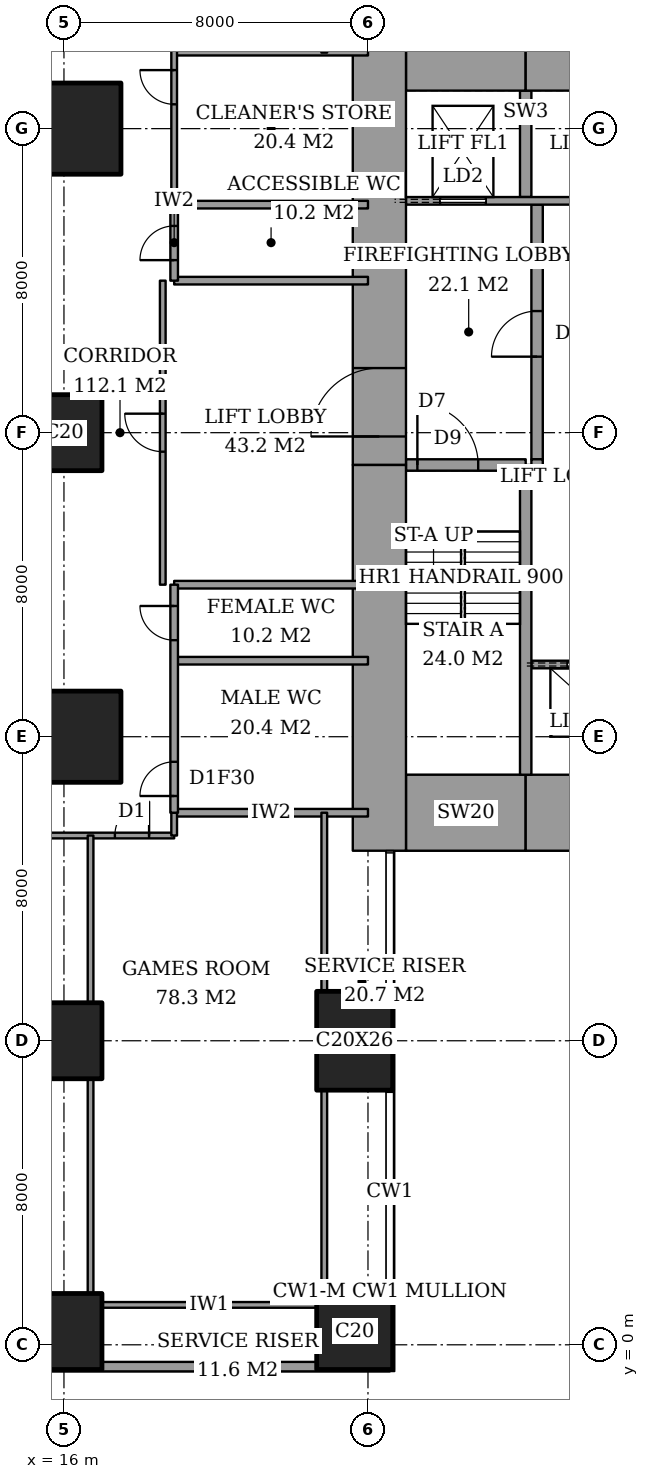
"""IFC4 building model, lengths in metres.
Left out: names, types, materials, properties, quantities, classifications, styles, units other than length and angle.
Written with IfcOpenShell. Run it as: python <this file> out.ifc"""

import sys

from ifc_helpers import new_model, si_unit, direction, frame, frame_2d, origin, origin_2d, place, context, subcontext, project, spatial, rectangle, extrude, element, fill, save


model = new_model("IFC4")
c1 = context("Model", 3, precision=1e-05, world=origin(), true_north=direction((0.0, 1.0)))
c2 = subcontext(c1, "Body", "Model", "MODEL_VIEW")
j1 = project(units=[si_unit("LENGTHUNIT", "METRE"), si_unit("PLANEANGLEUNIT", "RADIAN")], contexts=[c1])
p1 = place(None, origin())
s1 = spatial("IfcSite", under=j1, at=p1, CompositionType="ELEMENT")
p2 = place(p1, origin())
s2 = spatial("IfcBuilding", under=s1, at=p2, CompositionType="ELEMENT")
p3 = place(p2, frame((0.0, 0.0, 132.2)))
s3 = spatial("IfcBuildingStorey", under=s2, at=p3, CompositionType="ELEMENT", Elevation=132.2)
for number, where, z_axis, x_axis in (
    (1, (16.0, 0.35, 0.0), (0.0, 0.0, 1.0), (1.0, 0.0, 0.0)),
    (2, (16.0, 8.0, 0.0), (0.0, 0.0, 1.0), (1.0, 0.0, 0.0)),
):
    element("IfcColumn", number, at=place(p3, frame(where, z_axis=z_axis, x_axis=x_axis)), inside=s3, PredefinedType="COLUMN", context=c2, shape_type="SweptSolid", body=[
        extrude(rectangle(XDim=2.0, YDim=2.0, at=origin_2d()), origin(), (0.0, 0.0, 1.0), 3.6),
    ])
p4 = place(p3, frame((16.0, 16.0, 0.0), z_axis=(0.0, 0.0, 1.0), x_axis=(1.0, 0.0, 0.0)))
e3 = element("IfcColumn", 3, at=p4, inside=s3, PredefinedType="COLUMN", context=c2, shape_type="SweptSolid", body=[
    extrude(rectangle(XDim=3.0, YDim=2.4, at=origin_2d()), origin(), (0.0, 0.0, 1.0), 3.6),
])
p5 = place(p3, frame((16.0, 24.0, 0.0), z_axis=(0.0, 0.0, 1.0), x_axis=(1.0, 0.0, 0.0)))
e4 = element("IfcColumn", 4, at=p5, inside=s3, PredefinedType="COLUMN", context=c2, shape_type="SweptSolid", body=[
    extrude(rectangle(XDim=2.0, YDim=2.0, at=origin_2d()), origin(), (0.0, 0.0, 1.0), 3.6),
])
p6 = place(p3, frame((16.0, 32.0, 0.0), z_axis=(0.0, 0.0, 1.0), x_axis=(1.0, 0.0, 0.0)))
e5 = element("IfcColumn", 5, at=p6, inside=s3, PredefinedType="COLUMN", context=c2, shape_type="SweptSolid", body=[
    extrude(rectangle(XDim=3.0, YDim=2.4, at=origin_2d()), origin(), (0.0, 0.0, 1.0), 3.6),
])
p7 = place(p3, frame((23.65, 0.35, 0.0), z_axis=(0.0, 0.0, 1.0), x_axis=(1.0, 0.0, 0.0)))
e6 = element("IfcColumn", 6, at=p7, inside=s3, PredefinedType="COLUMN", context=c2, shape_type="SweptSolid", body=[
    extrude(rectangle(XDim=2.0, YDim=2.0, at=origin_2d()), origin(), (0.0, 0.0, 1.0), 3.6),
])
p8 = place(p3, frame((23.65, 8.0, 0.0), z_axis=(0.0, 0.0, 1.0), x_axis=(1.0, 0.0, 0.0)))
e7 = element("IfcColumn", 7, at=p8, inside=s3, PredefinedType="COLUMN", context=c2, shape_type="SweptSolid", body=[
    extrude(rectangle(XDim=2.0, YDim=2.6, at=origin_2d()), origin(), (0.0, 0.0, 1.0), 3.6),
])
p9 = place(p3, frame((25.0, 14.0, 0.0), z_axis=(0.0, 0.0, 1.0), x_axis=(1.0, 0.0, 0.0)))
e8 = element("IfcWall", 8, at=p9, inside=s3, PredefinedType="SHEAR", context=c2, shape_type="SweptSolid", body=[
    extrude(rectangle(XDim=3.15, YDim=2.0, at=frame_2d((1.575, 0.0))), origin(), (0.0, 0.0, 1.0), 3.6),
])
p10 = place(p3, frame((28.15, 14.0, 0.0), z_axis=(0.0, 0.0, 1.0), x_axis=(1.0, 0.0, 0.0)))
e9 = element("IfcWall", 9, at=p10, inside=s3, PredefinedType="SHEAR", context=c2, shape_type="SweptSolid", body=[
    extrude(rectangle(XDim=9.7, YDim=2.0, at=frame_2d((4.85, 0.0))), origin(), (0.0, 0.0, 1.0), 3.6),
])
p11 = place(p3, frame((25.0, 34.0, 0.0), z_axis=(0.0, 0.0, 1.0), x_axis=(1.0, 0.0, 0.0)))
e10 = element("IfcWall", 10, at=p11, inside=s3, PredefinedType="SHEAR", context=c2, shape_type="SweptSolid", body=[
    extrude(rectangle(XDim=3.15, YDim=2.0, at=frame_2d((1.575, 0.0))), origin(), (0.0, 0.0, 1.0), 3.6),
])
p12 = place(p3, frame((28.15, 34.0, 0.0), z_axis=(0.0, 0.0, 1.0), x_axis=(1.0, 0.0, 0.0)))
e11 = element("IfcWall", 11, at=p12, inside=s3, PredefinedType="SHEAR", context=c2, shape_type="SweptSolid", body=[
    extrude(rectangle(XDim=9.7, YDim=2.0, at=frame_2d((4.85, 0.0))), origin(), (0.0, 0.0, 1.0), 3.6),
])
p13 = place(p3, frame((24.3, 13.0, 0.0), z_axis=(0.0, 0.0, 1.0), x_axis=(0.0, 1.0, 0.0)))
e12 = element("IfcWall", 12, at=p13, inside=s3, PredefinedType="SHEAR", context=c2, shape_type="SweptSolid", body=[
    extrude(rectangle(XDim=10.15, YDim=1.4, at=frame_2d((5.075, 0.0))), origin(), (0.0, 0.0, 1.0), 3.6),
])
p14 = place(p3, frame((24.3, 23.15, 0.0), z_axis=(0.0, 0.0, 1.0), x_axis=(0.0, 1.0, 0.0)))
e13 = element("IfcWall", 13, at=p14, inside=s3, PredefinedType="SHEAR", context=c2, shape_type="SweptSolid", body=[
    extrude(rectangle(XDim=11.85, YDim=1.4, at=frame_2d((5.925, 0.0))), origin(), (0.0, 0.0, 1.0), 3.6),
])
p15 = place(p14, frame((0.75, 0.0, 0.0)))
e14 = element("IfcOpeningElement", 14, at=p15, cuts=e13, PredefinedType="OPENING", context=c2, shape_type="SweptSolid", body=[
    extrude(rectangle(XDim=1.8, YDim=2.4, at=frame_2d((0.9, 1.2))), frame((0.0, 0.71, 0.0), z_axis=(0.0, -1.0, 0.0), x_axis=(1.0, 0.0, 0.0)), (0.0, 0.0, 1.0), 1.42),
])
p16 = place(p3, frame((28.15, 15.0, 0.0), z_axis=(0.0, 0.0, 1.0), x_axis=(0.0, 1.0, 0.0)))
e15 = element("IfcWall", 15, at=p16, inside=s3, PredefinedType="SHEAR", context=c2, shape_type="SweptSolid", body=[
    extrude(rectangle(XDim=8.15, YDim=0.3, at=frame_2d((4.075, 0.0))), origin(), (0.0, 0.0, 1.0), 3.6),
])
p17 = place(p3, frame((25.0, 23.15, 0.0), z_axis=(0.0, 0.0, 1.0), x_axis=(1.0, 0.0, 0.0)))
e16 = element("IfcWall", 16, at=p17, inside=s3, PredefinedType="SHEAR", context=c2, shape_type="SweptSolid", body=[
    extrude(rectangle(XDim=3.15, YDim=0.3, at=frame_2d((1.575, 0.0))), origin(), (0.0, 0.0, 1.0), 3.6),
])
p18 = place(p17, frame((0.3, 0.0, 0.0)))
e17 = element("IfcOpeningElement", 17, at=p18, cuts=e16, PredefinedType="OPENING", context=c2, shape_type="SweptSolid", body=[
    extrude(rectangle(XDim=1.6, YDim=2.1, at=frame_2d((0.8, 1.05))), frame((0.0, 0.16, 0.0), z_axis=(0.0, -1.0, 0.0), x_axis=(1.0, 0.0, 0.0)), (0.0, 0.0, 1.0), 0.32),
])
p19 = place(p3, frame((28.45, 23.3, 0.0), z_axis=(0.0, 0.0, 1.0), x_axis=(0.0, 1.0, 0.0)))
e18 = element("IfcWall", 18, at=p19, inside=s3, PredefinedType="PARTITIONING", context=c2, shape_type="SweptSolid", body=[
    extrude(rectangle(XDim=6.7, YDim=0.3, at=frame_2d((3.35, 0.0))), origin(), (0.0, 0.0, 1.0), 3.6),
])
p20 = place(p19, frame((2.7, 0.0, 0.0)))
e19 = element("IfcOpeningElement", 19, at=p20, cuts=e18, PredefinedType="OPENING", context=c2, shape_type="SweptSolid", body=[
    extrude(rectangle(XDim=1.2, YDim=2.1, at=frame_2d((0.6, 1.05))), frame((0.0, 0.16, 0.0), z_axis=(0.0, -1.0, 0.0), x_axis=(1.0, 0.0, 0.0)), (0.0, 0.0, 1.0), 0.32),
])
p21 = place(p3, frame((3.175, -0.575, 0.0), z_axis=(0.0, 0.0, 1.0), x_axis=(1.0, 0.0, 0.0)))
e20 = element("IfcWall", 20, at=p21, inside=s3, PredefinedType="SOLIDWALL", context=c2, shape_type="SweptSolid", body=[
    extrude(rectangle(XDim=21.4, YDim=0.25, at=frame_2d((10.7, 0.0))), origin(), (0.0, 0.0, 1.0), 3.6),
])
p22 = place(p21, frame((0.625, 0.0, 0.4)))
e21 = element("IfcOpeningElement", 21, at=p22, cuts=e20, PredefinedType="OPENING", context=c2, shape_type="SweptSolid", body=[
    extrude(rectangle(XDim=1.2, YDim=2.2, at=frame_2d((0.6, 1.1))), frame((0.0, 0.135, 0.0), z_axis=(0.0, -1.0, 0.0), x_axis=(1.0, 0.0, 0.0)), (0.0, 0.0, 1.0), 0.27),
])
p23 = place(p3, frame((17.0, 1.05, 0.0), z_axis=(0.0, 0.0, 1.0), x_axis=(1.0, 0.0, 0.0)))
e22 = element("IfcWall", 22, at=p23, inside=s3, PredefinedType="PARTITIONING", context=c2, shape_type="SweptSolid", body=[
    extrude(rectangle(XDim=5.65, YDim=0.15, at=frame_2d((2.825, 0.0))), origin(), (0.0, 0.0, 1.0), 3.35),
])
p24 = place(p3, frame((13.5, 13.4, 0.0), z_axis=(0.0, 0.0, 1.0), x_axis=(1.0, 0.0, 0.0)))
e23 = element("IfcWall", 23, at=p24, inside=s3, PredefinedType="PARTITIONING", context=c2, shape_type="SweptSolid", body=[
    extrude(rectangle(XDim=5.4, YDim=0.15, at=frame_2d((2.7, 0.0))), origin(), (0.0, 0.0, 1.0), 3.35),
])
p25 = place(p24, frame((3.84, 0.0, 0.0)))
e24 = element("IfcOpeningElement", 24, at=p25, cuts=e23, PredefinedType="OPENING", context=c2, shape_type="SweptSolid", body=[
    extrude(rectangle(XDim=0.9, YDim=2.1, at=frame_2d((0.45, 1.05))), frame((0.0, 0.085, 0.0), z_axis=(0.0, -1.0, 0.0), x_axis=(1.0, 0.0, 0.0)), (0.0, 0.0, 1.0), 0.17),
])
for number, where, z_axis, x_axis in (
    (25, (18.9, 14.0, 0.0), (0.0, 0.0, 1.0), (1.0, 0.0, 0.0)),
    (26, (18.9, 18.0, 0.0), (0.0, 0.0, 1.0), (1.0, 0.0, 0.0)),
    (27, (18.9, 20.0, 0.0), (0.0, 0.0, 1.0), (1.0, 0.0, 0.0)),
    (28, (18.9, 28.0, 0.0), (0.0, 0.0, 1.0), (1.0, 0.0, 0.0)),
    (29, (18.9, 30.0, 0.0), (0.0, 0.0, 1.0), (1.0, 0.0, 0.0)),
):
    element("IfcWall", number, at=place(p3, frame(where, z_axis=z_axis, x_axis=x_axis)), inside=s3, PredefinedType="PARTITIONING", context=c2, shape_type="SweptSolid", body=[
        extrude(rectangle(XDim=5.1, YDim=0.2, at=frame_2d((2.55, 0.0))), origin(), (0.0, 0.0, 1.0), 3.35),
    ])
p26 = place(p3, frame((18.9, 34.0, 0.0), z_axis=(0.0, 0.0, 1.0), x_axis=(1.0, 0.0, 0.0)))
e30 = element("IfcWall", 30, at=p26, inside=s3, PredefinedType="PARTITIONING", context=c2, shape_type="SweptSolid", body=[
    extrude(rectangle(XDim=5.1, YDim=0.15, at=frame_2d((2.55, 0.0))), origin(), (0.0, 0.0, 1.0), 3.35),
])
p27 = place(p3, frame((16.7, 1.35, 0.0), z_axis=(0.0, 0.0, 1.0), x_axis=(0.0, 1.0, 0.0)))
e31 = element("IfcWall", 31, at=p27, inside=s3, PredefinedType="PARTITIONING", context=c2, shape_type="SweptSolid", body=[
    extrude(rectangle(XDim=5.65, YDim=0.15, at=frame_2d((2.825, 0.0))), origin(), (0.0, 0.0, 1.0), 3.35),
])
p28 = place(p3, frame((16.7, 9.0, 0.0), z_axis=(0.0, 0.0, 1.0), x_axis=(0.0, 1.0, 0.0)))
e32 = element("IfcWall", 32, at=p28, inside=s3, PredefinedType="PARTITIONING", context=c2, shape_type="SweptSolid", body=[
    extrude(rectangle(XDim=4.4, YDim=0.15, at=frame_2d((2.2, 0.0))), origin(), (0.0, 0.0, 1.0), 3.35),
])
p29 = place(p3, frame((18.6, 20.0, 0.0), z_axis=(0.0, 0.0, 1.0), x_axis=(0.0, 1.0, 0.0)))
e33 = element("IfcWall", 33, at=p29, inside=s3, PredefinedType="PARTITIONING", context=c2, shape_type="SweptSolid", body=[
    extrude(rectangle(XDim=8.0, YDim=0.15, at=frame_2d((4.0, 0.0))), origin(), (0.0, 0.0, 1.0), 3.35),
])
p30 = place(p29, frame((3.5, 0.0, 0.0)))
e34 = element("IfcOpeningElement", 34, at=p30, cuts=e33, PredefinedType="OPENING", context=c2, shape_type="SweptSolid", body=[
    extrude(rectangle(XDim=1.0, YDim=2.1, at=frame_2d((0.5, 1.05))), frame((0.0, 0.085, 0.0), z_axis=(0.0, -1.0, 0.0), x_axis=(1.0, 0.0, 0.0)), (0.0, 0.0, 1.0), 0.17),
])
p31 = place(p3, frame((18.9, 14.0, 0.0), z_axis=(0.0, 0.0, 1.0), x_axis=(0.0, 1.0, 0.0)))
e35 = element("IfcWall", 35, at=p31, inside=s3, PredefinedType="PARTITIONING", context=c2, shape_type="SweptSolid", body=[
    extrude(rectangle(XDim=6.0, YDim=0.2, at=frame_2d((3.0, 0.0))), origin(), (0.0, 0.0, 1.0), 3.35),
])
p32 = place(p31, frame((0.44, 0.0, 0.0)))
e36 = element("IfcOpeningElement", 36, at=p32, cuts=e35, PredefinedType="OPENING", context=c2, shape_type="SweptSolid", body=[
    extrude(rectangle(XDim=0.9, YDim=2.1, at=frame_2d((0.45, 1.05))), frame((0.0, 0.11, 0.0), z_axis=(0.0, -1.0, 0.0), x_axis=(1.0, 0.0, 0.0)), (0.0, 0.0, 1.0), 0.22),
])
p33 = place(p31, frame((4.54, 0.0, 0.0)))
e37 = element("IfcOpeningElement", 37, at=p33, cuts=e35, PredefinedType="OPENING", context=c2, shape_type="SweptSolid", body=[
    extrude(rectangle(XDim=0.9, YDim=2.1, at=frame_2d((0.45, 1.05))), frame((0.0, 0.11, 0.0), z_axis=(0.0, -1.0, 0.0), x_axis=(1.0, 0.0, 0.0)), (0.0, 0.0, 1.0), 0.22),
])
p34 = place(p3, frame((18.9, 28.0, 0.0), z_axis=(0.0, 0.0, 1.0), x_axis=(0.0, 1.0, 0.0)))
e38 = element("IfcWall", 38, at=p34, inside=s3, PredefinedType="PARTITIONING", context=c2, shape_type="SweptSolid", body=[
    extrude(rectangle(XDim=2.0, YDim=0.2, at=frame_2d((1.0, 0.0))), origin(), (0.0, 0.0, 1.0), 3.35),
])
p35 = place(p34, frame((0.54, 0.0, 0.0)))
e39 = element("IfcOpeningElement", 39, at=p35, cuts=e38, PredefinedType="OPENING", context=c2, shape_type="SweptSolid", body=[
    extrude(rectangle(XDim=0.9, YDim=2.1, at=frame_2d((0.45, 1.05))), frame((0.0, 0.11, 0.0), z_axis=(0.0, -1.0, 0.0), x_axis=(1.0, 0.0, 0.0)), (0.0, 0.0, 1.0), 0.22),
])
p36 = place(p3, frame((18.9, 13.4, 0.0), z_axis=(0.0, 0.0, 1.0), x_axis=(0.0, 1.0, 0.0)))
e40 = element("IfcWall", 40, at=p36, inside=s3, PredefinedType="PARTITIONING", context=c2, shape_type="SweptSolid", body=[
    extrude(rectangle(XDim=0.6, YDim=0.15, at=frame_2d((0.3, 0.0))), origin(), (0.0, 0.0, 1.0), 3.35),
])
p37 = place(p3, frame((18.9, 30.0, 0.0), z_axis=(0.0, 0.0, 1.0), x_axis=(0.0, 1.0, 0.0)))
e41 = element("IfcWall", 41, at=p37, inside=s3, PredefinedType="PARTITIONING", context=c2, shape_type="SweptSolid", body=[
    extrude(rectangle(XDim=4.6, YDim=0.15, at=frame_2d((2.3, 0.0))), origin(), (0.0, 0.0, 1.0), 3.35),
])
p38 = place(p37, frame((2.64, 0.0, 0.0)))
e42 = element("IfcOpeningElement", 42, at=p38, cuts=e41, PredefinedType="OPENING", context=c2, shape_type="SweptSolid", body=[
    extrude(rectangle(XDim=0.9, YDim=2.1, at=frame_2d((0.45, 1.05))), frame((0.0, 0.085, 0.0), z_axis=(0.0, -1.0, 0.0), x_axis=(1.0, 0.0, 0.0)), (0.0, 0.0, 1.0), 0.17),
])
p39 = place(p3, frame((22.85, 1.35, 0.0), z_axis=(0.0, 0.0, 1.0), x_axis=(0.0, 1.0, 0.0)))
e43 = element("IfcWall", 43, at=p39, inside=s3, PredefinedType="PARTITIONING", context=c2, shape_type="SweptSolid", body=[
    extrude(rectangle(XDim=5.35, YDim=0.15, at=frame_2d((2.675, 0.0))), origin(), (0.0, 0.0, 1.0), 3.35),
])
p40 = place(p3, frame((22.85, 9.3, 0.0), z_axis=(0.0, 0.0, 1.0), x_axis=(0.0, 1.0, 0.0)))
e44 = element("IfcWall", 44, at=p40, inside=s3, PredefinedType="PARTITIONING", context=c2, shape_type="SweptSolid", body=[
    extrude(rectangle(XDim=4.7, YDim=0.15, at=frame_2d((2.35, 0.0))), origin(), (0.0, 0.0, 1.0), 3.35),
])
p41 = place(p3, frame((28.3, 17.9, 0.0), z_axis=(0.0, 0.0, 1.0), x_axis=(1.0, 0.0, 0.0)))
e45 = element("IfcWall", 45, at=p41, inside=s3, PredefinedType="PARTITIONING", context=c2, shape_type="SweptSolid", body=[
    extrude(rectangle(XDim=12.7, YDim=0.2, at=frame_2d((6.35, 0.0))), origin(), (0.0, 0.0, 1.0), 3.6),
])
p42 = place(p41, frame((0.95, 0.0, 0.0)))
e46 = element("IfcOpeningElement", 46, at=p42, cuts=e45, PredefinedType="OPENING", context=c2, shape_type="SweptSolid", body=[
    extrude(rectangle(XDim=1.1, YDim=2.1, at=frame_2d((0.55, 1.05))), frame((0.0, 0.11, 0.0), z_axis=(0.0, -1.0, 0.0), x_axis=(1.0, 0.0, 0.0)), (0.0, 0.0, 1.0), 0.22),
])
p43 = place(p41, frame((4.15, 0.0, 0.0)))
e47 = element("IfcOpeningElement", 47, at=p43, cuts=e45, PredefinedType="OPENING", context=c2, shape_type="SweptSolid", body=[
    extrude(rectangle(XDim=1.1, YDim=2.1, at=frame_2d((0.55, 1.05))), frame((0.0, 0.11, 0.0), z_axis=(0.0, -1.0, 0.0), x_axis=(1.0, 0.0, 0.0)), (0.0, 0.0, 1.0), 0.22),
])
p44 = place(p41, frame((7.35, 0.0, 0.0)))
e48 = element("IfcOpeningElement", 48, at=p44, cuts=e45, PredefinedType="OPENING", context=c2, shape_type="SweptSolid", body=[
    extrude(rectangle(XDim=1.1, YDim=2.1, at=frame_2d((0.55, 1.05))), frame((0.0, 0.11, 0.0), z_axis=(0.0, -1.0, 0.0), x_axis=(1.0, 0.0, 0.0)), (0.0, 0.0, 1.0), 0.22),
])
p45 = place(p41, frame((10.6, 0.0, 0.0)))
e49 = element("IfcOpeningElement", 49, at=p45, cuts=e45, PredefinedType="OPENING", context=c2, shape_type="SweptSolid", body=[
    extrude(rectangle(XDim=1.2, YDim=2.1, at=frame_2d((0.6, 1.05))), frame((0.0, 0.11, 0.0), z_axis=(0.0, -1.0, 0.0), x_axis=(1.0, 0.0, 0.0)), (0.0, 0.0, 1.0), 0.22),
])
p46 = place(p3, frame((25.0, 30.1, 0.0), z_axis=(0.0, 0.0, 1.0), x_axis=(1.0, 0.0, 0.0)))
e50 = element("IfcWall", 50, at=p46, inside=s3, PredefinedType="PARTITIONING", context=c2, shape_type="SweptSolid", body=[
    extrude(rectangle(XDim=12.7, YDim=0.2, at=frame_2d((6.35, 0.0))), origin(), (0.0, 0.0, 1.0), 3.6),
])
p47 = place(p46, frame((0.9, 0.0, 0.0)))
e51 = element("IfcOpeningElement", 51, at=p47, cuts=e50, PredefinedType="OPENING", context=c2, shape_type="SweptSolid", body=[
    extrude(rectangle(XDim=1.2, YDim=2.1, at=frame_2d((0.6, 1.05))), frame((0.0, 0.11, 0.0), z_axis=(0.0, -1.0, 0.0), x_axis=(1.0, 0.0, 0.0)), (0.0, 0.0, 1.0), 0.22),
])
p48 = place(p3, frame((28.15, 30.2, 0.0), z_axis=(0.0, 0.0, 1.0), x_axis=(0.0, 1.0, 0.0)))
e52 = element("IfcWall", 52, at=p48, inside=s3, PredefinedType="SHEAR", context=c2, shape_type="SweptSolid", body=[
    extrude(rectangle(XDim=2.8, YDim=0.3, at=frame_2d((1.4, 0.0))), origin(), (0.0, 0.0, 1.0), 3.6),
])
p49 = place(p3, frame((28.3, 23.2, 0.0), z_axis=(0.0, 0.0, 1.0), x_axis=(1.0, 0.0, 0.0)))
e53 = element("IfcWall", 53, at=p49, inside=s3, PredefinedType="PARTITIONING", context=c2, shape_type="SweptSolid", body=[
    extrude(rectangle(XDim=0.3, YDim=0.2, at=frame_2d((0.15, 0.0))), origin(), (0.0, 0.0, 1.0), 3.6),
])
p50 = place(p30, origin())
e54 = element("IfcDoor", 54, at=p50, inside=s3, OperationType="SINGLE_SWING_LEFT", PredefinedType="DOOR", context=c2, shape_type="SweptSolid", body=[
    extrude(rectangle(XDim=1.0, YDim=2.1, at=frame_2d((0.5, 1.05))), frame((0.0, 0.025, 0.0), z_axis=(0.0, -1.0, 0.0), x_axis=(1.0, 0.0, 0.0)), (0.0, 0.0, 1.0), 0.05),
])
fill(e34, e54)
p51 = place(p32, origin())
e55 = element("IfcDoor", 55, at=p51, inside=s3, OperationType="SINGLE_SWING_RIGHT", PredefinedType="DOOR", context=c2, shape_type="SweptSolid", body=[
    extrude(rectangle(XDim=0.9, YDim=2.1, at=frame_2d((0.45, 1.05))), frame((0.0, 0.025, 0.0), z_axis=(0.0, -1.0, 0.0), x_axis=(1.0, 0.0, 0.0)), (0.0, 0.0, 1.0), 0.05),
])
fill(e36, e55)
p52 = place(p33, origin())
e56 = element("IfcDoor", 56, at=p52, inside=s3, OperationType="SINGLE_SWING_LEFT", PredefinedType="DOOR", context=c2, shape_type="SweptSolid", body=[
    extrude(rectangle(XDim=0.9, YDim=2.1, at=frame_2d((0.45, 1.05))), frame((0.0, 0.025, 0.0), z_axis=(0.0, -1.0, 0.0), x_axis=(1.0, 0.0, 0.0)), (0.0, 0.0, 1.0), 0.05),
])
fill(e37, e56)
p53 = place(p35, origin())
e57 = element("IfcDoor", 57, at=p53, inside=s3, OperationType="SINGLE_SWING_RIGHT", PredefinedType="DOOR", context=c2, shape_type="SweptSolid", body=[
    extrude(rectangle(XDim=0.9, YDim=2.1, at=frame_2d((0.45, 1.05))), frame((0.0, 0.025, 0.0), z_axis=(0.0, -1.0, 0.0), x_axis=(1.0, 0.0, 0.0)), (0.0, 0.0, 1.0), 0.05),
])
fill(e39, e57)
p54 = place(p38, origin())
e58 = element("IfcDoor", 58, at=p54, inside=s3, OperationType="SINGLE_SWING_LEFT", PredefinedType="DOOR", context=c2, shape_type="SweptSolid", body=[
    extrude(rectangle(XDim=0.9, YDim=2.1, at=frame_2d((0.45, 1.05))), frame((0.0, 0.025, 0.0), z_axis=(0.0, -1.0, 0.0), x_axis=(1.0, 0.0, 0.0)), (0.0, 0.0, 1.0), 0.05),
])
fill(e42, e58)
p55 = place(p25, origin())
e59 = element("IfcDoor", 59, at=p55, inside=s3, OperationType="SINGLE_SWING_LEFT", PredefinedType="DOOR", context=c2, shape_type="SweptSolid", body=[
    extrude(rectangle(XDim=0.9, YDim=2.1, at=frame_2d((0.45, 1.05))), frame((0.0, 0.025, 0.0), z_axis=(0.0, -1.0, 0.0), x_axis=(1.0, 0.0, 0.0)), (0.0, 0.0, 1.0), 0.05),
])
fill(e24, e59)
p56 = place(p18, origin())
e60 = element("IfcDoor", 60, at=p56, inside=s3, OperationType="DOUBLE_DOOR_SINGLE_SWING", PredefinedType="DOOR", context=c2, shape_type="SweptSolid", body=[
    extrude(rectangle(XDim=1.6, YDim=2.1, at=frame_2d((0.8, 1.05))), frame((0.0, 0.025, 0.0), z_axis=(0.0, -1.0, 0.0), x_axis=(1.0, 0.0, 0.0)), (0.0, 0.0, 1.0), 0.05),
])
fill(e17, e60)
p57 = place(p20, origin())
e61 = element("IfcDoor", 61, at=p57, inside=s3, OperationType="SINGLE_SWING_RIGHT", PredefinedType="DOOR", context=c2, shape_type="SweptSolid", body=[
    extrude(rectangle(XDim=1.2, YDim=2.1, at=frame_2d((0.6, 1.05))), frame((0.0, 0.025, 0.0), z_axis=(0.0, -1.0, 0.0), x_axis=(1.0, 0.0, 0.0)), (0.0, 0.0, 1.0), 0.05),
])
fill(e19, e61)
p58 = place(p15, origin())
e62 = element("IfcDoor", 62, at=p58, inside=s3, OperationType="DOUBLE_DOOR_DOUBLE_SWING", PredefinedType="DOOR", context=c2, shape_type="SweptSolid", body=[
    extrude(rectangle(XDim=1.8, YDim=2.4, at=frame_2d((0.9, 1.2))), frame((0.0, 0.025, 0.0), z_axis=(0.0, -1.0, 0.0), x_axis=(1.0, 0.0, 0.0)), (0.0, 0.0, 1.0), 0.05),
])
fill(e14, e62)
p59 = place(p42, origin())
e63 = element("IfcDoor", 63, at=p59, inside=s3, OperationType="SLIDING_TO_LEFT", PredefinedType="DOOR", context=c2, shape_type="SweptSolid", body=[
    extrude(rectangle(XDim=1.1, YDim=2.1, at=frame_2d((0.55, 1.05))), frame((0.0, 0.025, 0.0), z_axis=(0.0, -1.0, 0.0), x_axis=(1.0, 0.0, 0.0)), (0.0, 0.0, 1.0), 0.05),
])
fill(e46, e63)
p60 = place(p47, origin())
e64 = element("IfcDoor", 64, at=p60, inside=s3, OperationType="SLIDING_TO_LEFT", PredefinedType="DOOR", context=c2, shape_type="SweptSolid", body=[
    extrude(rectangle(XDim=1.2, YDim=2.1, at=frame_2d((0.6, 1.05))), frame((0.0, 0.025, 0.0), z_axis=(0.0, -1.0, 0.0), x_axis=(1.0, 0.0, 0.0)), (0.0, 0.0, 1.0), 0.05),
])
fill(e51, e64)
save(model, sys.argv[1])
